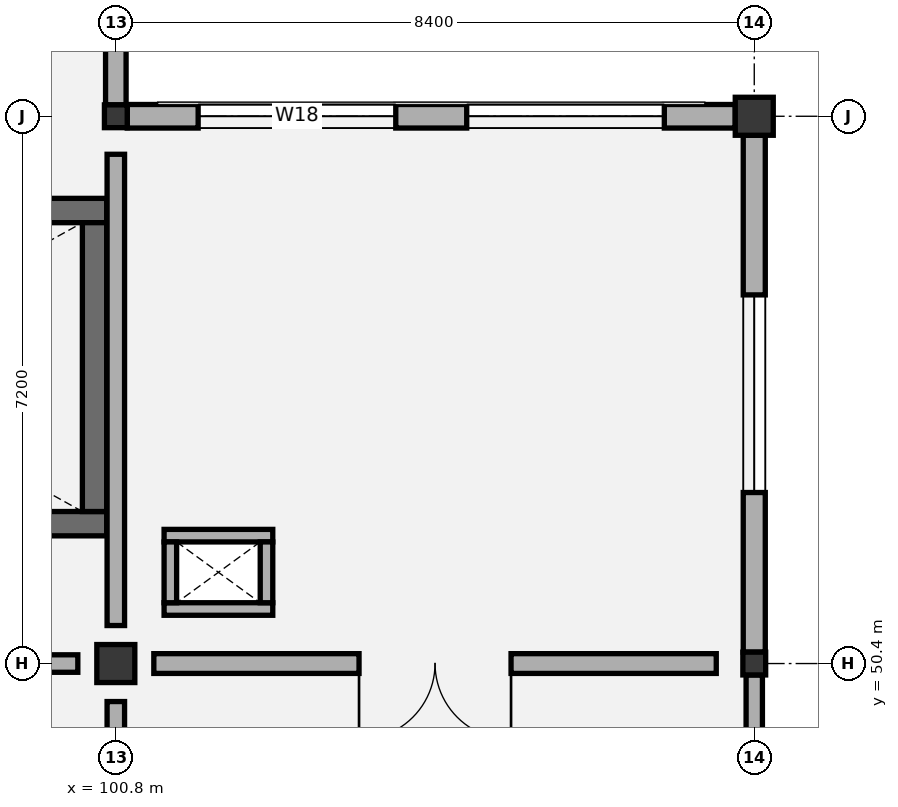
"""IFC4 building model, lengths in metres.
Left out: names, types, materials, properties, quantities, classifications, styles, units other than length and angle.
Written with IfcOpenShell. Run it as: python <this file> out.ifc"""

import sys

from ifc_helpers import new_model, si_unit, direction, frame, frame_2d, origin, origin_2d, place, context, subcontext, project, spatial, rectangle, i_section, extrude, element, fill, save


model = new_model("IFC4")
c1 = context("Model", 3, precision=1e-05, world=origin(), true_north=direction((0.0, 1.0)))
c2 = subcontext(c1, "Body", "Model", "MODEL_VIEW")
j1 = project(units=[si_unit("LENGTHUNIT", "METRE"), si_unit("PLANEANGLEUNIT", "RADIAN")], contexts=[c1])
p1 = place(None, origin())
s1 = spatial("IfcSite", under=j1, at=p1, CompositionType="ELEMENT")
p2 = place(p1, origin())
s2 = spatial("IfcBuilding", under=s1, at=p2, CompositionType="ELEMENT")
p3 = place(p2, frame((0.0, 0.0, 69.0)))
s3 = spatial("IfcBuildingStorey", under=s2, at=p3, CompositionType="ELEMENT", Elevation=69.0)
p4 = place(p3, frame((100.8, 50.4, 0.0), z_axis=(0.0, 0.0, 1.0), x_axis=(1.0, 0.0, 0.0)))
e1 = element("IfcColumn", 1, at=p4, inside=s3, PredefinedType="COLUMN", context=c2, shape_type="SweptSolid", body=[
    extrude(rectangle(XDim=0.5, YDim=0.5, at=origin_2d()), origin(), (0.0, 0.0, 1.0), 4.8),
])
for number, where, z_axis, x_axis in (
    (2, (100.8, 57.6, 0.0), (0.0, 0.0, 1.0), (1.0, 0.0, 0.0)),
    (3, (109.2, 50.4, 0.0), (0.0, 0.0, 1.0), (1.0, 0.0, 0.0)),
):
    element("IfcColumn", number, at=place(p3, frame(where, z_axis=z_axis, x_axis=x_axis)), inside=s3, PredefinedType="COLUMN", context=c2, shape_type="SweptSolid", body=[
        extrude(i_section(OverallWidth=0.3, OverallDepth=0.3, WebThickness=0.011, FlangeThickness=0.019, FilletRadius=0.027, at=origin_2d()), origin(), (0.0, 0.0, 1.0), 4.8),
    ])
p5 = place(p3, frame((109.2, 57.6, 0.0), z_axis=(0.0, 0.0, 1.0), x_axis=(1.0, 0.0, 0.0)))
e4 = element("IfcColumn", 4, at=p5, inside=s3, PredefinedType="COLUMN", context=c2, shape_type="SweptSolid", body=[
    extrude(rectangle(XDim=0.5, YDim=0.5, at=origin_2d()), origin(), (0.0, 0.0, 1.0), 4.8),
])
p6 = place(p3, frame((93.2, 52.24, 0.0), z_axis=(0.0, 0.0, 1.0), x_axis=(1.0, 0.0, 0.0)))
e5 = element("IfcWall", 5, at=p6, inside=s3, PredefinedType="SHEAR", context=c2, shape_type="SweptSolid", body=[
    extrude(rectangle(XDim=7.48, YDim=0.32, at=frame_2d((3.74, 0.0))), origin(), (0.0, 0.0, 1.0), 4.6),
])
p7 = place(p6, frame((0.45, 0.0, 0.0)))
e6 = element("IfcOpeningElement", 6, at=p7, cuts=e5, PredefinedType="OPENING", context=c2, shape_type="SweptSolid", body=[
    extrude(rectangle(XDim=1.05, YDim=2.15, at=frame_2d((0.525, 1.075))), frame((0.0, 0.17, 0.0), z_axis=(0.0, -1.0, 0.0), x_axis=(1.0, 0.0, 0.0)), (0.0, 0.0, 1.0), 0.34),
])
p8 = place(p3, frame((93.2, 56.36, 0.0), z_axis=(0.0, 0.0, 1.0), x_axis=(1.0, 0.0, 0.0)))
e7 = element("IfcWall", 7, at=p8, inside=s3, PredefinedType="SHEAR", context=c2, shape_type="SweptSolid", body=[
    extrude(rectangle(XDim=7.48, YDim=0.32, at=frame_2d((3.74, 0.0))), origin(), (0.0, 0.0, 1.0), 4.6),
])
p9 = place(p3, frame((100.52, 52.4, 0.0), z_axis=(0.0, 0.0, 1.0), x_axis=(0.0, 1.0, 0.0)))
e8 = element("IfcWall", 8, at=p9, inside=s3, PredefinedType="SHEAR", context=c2, shape_type="SweptSolid", body=[
    extrude(rectangle(XDim=3.8, YDim=0.32, at=frame_2d((1.9, 0.0))), origin(), (0.0, 0.0, 1.0), 4.6),
])
p10 = place(p3, frame((100.8, 57.75, 0.0), z_axis=(0.0, 0.0, 1.0), x_axis=(0.0, 1.0, 0.0)))
e9 = element("IfcWall", 9, at=p10, inside=s3, PredefinedType="SOLIDWALL", context=c2, shape_type="SweptSolid", body=[
    extrude(rectangle(XDim=6.8, YDim=0.27, at=frame_2d((3.4, 0.0))), origin(), (0.0, 0.0, 1.0), 4.045),
])
p11 = place(p10, frame((1.8, 0.0, 1.45)))
e10 = element("IfcOpeningElement", 10, at=p11, cuts=e9, PredefinedType="OPENING", context=c2, shape_type="SweptSolid", body=[
    extrude(rectangle(XDim=3.2, YDim=1.2, at=frame_2d((1.6, 0.6))), frame((0.0, 0.145, 0.0), z_axis=(0.0, -1.0, 0.0), x_axis=(1.0, 0.0, 0.0)), (0.0, 0.0, 1.0), 0.29),
])
p12 = place(p3, frame((109.2, 43.45, 0.0), z_axis=(0.0, 0.0, 1.0), x_axis=(0.0, 1.0, 0.0)))
e11 = element("IfcWall", 11, at=p12, inside=s3, PredefinedType="SOLIDWALL", context=c2, shape_type="SweptSolid", body=[
    extrude(rectangle(XDim=6.8, YDim=0.215, at=frame_2d((3.4, 0.0))), origin(), (0.0, 0.0, 1.0), 4.045),
])
p13 = place(p12, frame((0.867, 0.0, 1.45)))
e12 = element("IfcOpeningElement", 12, at=p13, cuts=e11, PredefinedType="OPENING", context=c2, shape_type="SweptSolid", body=[
    extrude(rectangle(XDim=2.1, YDim=1.35, at=frame_2d((1.05, 0.675))), frame((0.0, 0.117, 0.0), z_axis=(0.0, -1.0, 0.0), x_axis=(1.0, 0.0, 0.0)), (0.0, 0.0, 1.0), 0.235),
])
p14 = place(p12, frame((3.833, 0.0, 1.45)))
e13 = element("IfcOpeningElement", 13, at=p14, cuts=e11, PredefinedType="OPENING", context=c2, shape_type="SweptSolid", body=[
    extrude(rectangle(XDim=2.1, YDim=1.35, at=frame_2d((1.05, 0.675))), frame((0.0, 0.117, 0.0), z_axis=(0.0, -1.0, 0.0), x_axis=(1.0, 0.0, 0.0)), (0.0, 0.0, 1.0), 0.235),
])
p15 = place(p3, frame((100.95, 57.6, 0.0), z_axis=(0.0, 0.0, 1.0), x_axis=(1.0, 0.0, 0.0)))
e14 = element("IfcWall", 14, at=p15, inside=s3, PredefinedType="SOLIDWALL", context=c2, shape_type="SweptSolid", body=[
    extrude(rectangle(XDim=8.0, YDim=0.31, at=frame_2d((4.0, 0.0))), origin(), (0.0, 0.0, 1.0), 4.365),
])
p16 = place(p15, frame((0.933, 0.0, 1.45)))
e15 = element("IfcOpeningElement", 15, at=p16, cuts=e14, PredefinedType="OPENING", context=c2, shape_type="SweptSolid", body=[
    extrude(rectangle(XDim=2.6, YDim=1.2, at=frame_2d((1.3, 0.6))), frame((0.0, 0.165, 0.0), z_axis=(0.0, -1.0, 0.0), x_axis=(1.0, 0.0, 0.0)), (0.0, 0.0, 1.0), 0.33),
])
p17 = place(p15, frame((4.467, 0.0, 1.45)))
e16 = element("IfcOpeningElement", 16, at=p17, cuts=e14, PredefinedType="OPENING", context=c2, shape_type="SweptSolid", body=[
    extrude(rectangle(XDim=2.6, YDim=1.2, at=frame_2d((1.3, 0.6))), frame((0.0, 0.165, 0.0), z_axis=(0.0, -1.0, 0.0), x_axis=(1.0, 0.0, 0.0)), (0.0, 0.0, 1.0), 0.33),
])
p18 = place(p3, frame((109.2, 50.55, 0.0), z_axis=(0.0, 0.0, 1.0), x_axis=(0.0, 1.0, 0.0)))
e17 = element("IfcWall", 17, at=p18, inside=s3, PredefinedType="SOLIDWALL", context=c2, shape_type="SweptSolid", body=[
    extrude(rectangle(XDim=6.8, YDim=0.29, at=frame_2d((3.4, 0.0))), origin(), (0.0, 0.0, 1.0), 4.045),
])
p19 = place(p18, frame((2.1, 0.0, 1.45)))
e18 = element("IfcOpeningElement", 18, at=p19, cuts=e17, PredefinedType="OPENING", context=c2, shape_type="SweptSolid", body=[
    extrude(rectangle(XDim=2.6, YDim=1.2, at=frame_2d((1.3, 0.6))), frame((0.0, 0.155, 0.0), z_axis=(0.0, -1.0, 0.0), x_axis=(1.0, 0.0, 0.0)), (0.0, 0.0, 1.0), 0.31),
])
p20 = place(p3, frame((109.2, 57.72, 0.0), z_axis=(0.0, 0.0, 1.0), x_axis=(0.0, 1.0, 0.0)))
e19 = element("IfcWall", 19, at=p20, inside=s3, PredefinedType="PARAPET", context=c2, shape_type="SweptSolid", body=[
    extrude(rectangle(XDim=6.96, YDim=0.185, at=frame_2d((3.48, 0.0))), origin(), (0.0, 0.0, 1.0), 1.15),
])
for number, where, z_axis, x_axis in (
    (20, (101.435, 51.117, 0.0), (0.0, 0.0, 1.0), (1.0, 0.0, 0.0)),
    (21, (101.435, 52.083, 0.0), (0.0, 0.0, 1.0), (1.0, 0.0, 0.0)),
):
    element("IfcWall", number, at=place(p3, frame(where, z_axis=z_axis, x_axis=x_axis)), inside=s3, PredefinedType="PARTITIONING", context=c2, shape_type="SweptSolid", body=[
        extrude(rectangle(XDim=1.43, YDim=0.165, at=frame_2d((0.715, 0.0))), origin(), (0.0, 0.0, 1.0), 4.6),
    ])
for number, where, z_axis, x_axis in (
    (22, (101.518, 51.2, 0.0), (0.0, 0.0, 1.0), (0.0, 1.0, 0.0)),
    (23, (102.782, 51.2, 0.0), (0.0, 0.0, 1.0), (0.0, 1.0, 0.0)),
):
    element("IfcWall", number, at=place(p3, frame(where, z_axis=z_axis, x_axis=x_axis)), inside=s3, PredefinedType="PARTITIONING", context=c2, shape_type="SweptSolid", body=[
        extrude(rectangle(XDim=0.8, YDim=0.165, at=frame_2d((0.4, 0.0))), origin(), (0.0, 0.0, 1.0), 4.6),
    ])
p21 = place(p3, frame((100.8, 43.7, 0.0), z_axis=(0.0, 0.0, 1.0), x_axis=(0.0, 1.0, 0.0)))
e24 = element("IfcWall", 24, at=p21, inside=s3, PredefinedType="PARTITIONING", context=c2, shape_type="SweptSolid", body=[
    extrude(rectangle(XDim=6.2, YDim=0.23, at=frame_2d((3.1, 0.0))), origin(), (0.0, 0.0, 1.0), 4.095),
])
p22 = place(p21, frame((2.1, 0.0, 0.0)))
e25 = element("IfcOpeningElement", 25, at=p22, cuts=e24, PredefinedType="OPENING", context=c2, shape_type="SweptSolid", body=[
    extrude(rectangle(XDim=2.0, YDim=2.35, at=frame_2d((1.0, 1.175))), frame((0.0, 0.125, 0.0), z_axis=(0.0, -1.0, 0.0), x_axis=(1.0, 0.0, 0.0)), (0.0, 0.0, 1.0), 0.25),
])
p23 = place(p3, frame((92.9, 50.4, 0.0), z_axis=(0.0, 0.0, 1.0), x_axis=(1.0, 0.0, 0.0)))
e26 = element("IfcWall", 26, at=p23, inside=s3, PredefinedType="PARTITIONING", context=c2, shape_type="SweptSolid", body=[
    extrude(rectangle(XDim=7.4, YDim=0.23, at=frame_2d((3.7, 0.0))), origin(), (0.0, 0.0, 1.0), 3.995),
])
p24 = place(p23, frame((2.95, 0.0, 0.0)))
e27 = element("IfcOpeningElement", 27, at=p24, cuts=e26, PredefinedType="OPENING", context=c2, shape_type="SweptSolid", body=[
    extrude(rectangle(XDim=1.5, YDim=2.15, at=frame_2d((0.75, 1.075))), frame((0.0, 0.125, 0.0), z_axis=(0.0, -1.0, 0.0), x_axis=(1.0, 0.0, 0.0)), (0.0, 0.0, 1.0), 0.25),
])
p25 = place(p3, frame((100.8, 50.9, 0.0), z_axis=(0.0, 0.0, 1.0), x_axis=(0.0, 1.0, 0.0)))
e28 = element("IfcWall", 28, at=p25, inside=s3, PredefinedType="PARTITIONING", context=c2, shape_type="SweptSolid", body=[
    extrude(rectangle(XDim=6.2, YDim=0.23, at=frame_2d((3.1, 0.0))), origin(), (0.0, 0.0, 1.0), 4.095),
])
p26 = place(p3, frame((101.3, 50.4, 0.0), z_axis=(0.0, 0.0, 1.0), x_axis=(1.0, 0.0, 0.0)))
e29 = element("IfcWall", 29, at=p26, inside=s3, PredefinedType="PARTITIONING", context=c2, shape_type="SweptSolid", body=[
    extrude(rectangle(XDim=7.4, YDim=0.26, at=frame_2d((3.7, 0.0))), origin(), (0.0, 0.0, 1.0), 4.095),
])
p27 = place(p26, frame((2.7, 0.0, 0.0)))
e30 = element("IfcOpeningElement", 30, at=p27, cuts=e29, PredefinedType="OPENING", context=c2, shape_type="SweptSolid", body=[
    extrude(rectangle(XDim=2.0, YDim=2.35, at=frame_2d((1.0, 1.175))), frame((0.0, 0.14, 0.0), z_axis=(0.0, -1.0, 0.0), x_axis=(1.0, 0.0, 0.0)), (0.0, 0.0, 1.0), 0.28),
])
p28 = place(p16, origin())
e31 = element("IfcWindow", 31, at=p28, inside=s3, PartitioningType="SINGLE_PANEL", PredefinedType="WINDOW", context=c2, shape_type="SweptSolid", body=[
    extrude(rectangle(XDim=2.6, YDim=1.2, at=frame_2d((1.3, 0.6))), frame((0.0, 0.03, 0.0), z_axis=(0.0, -1.0, 0.0), x_axis=(1.0, 0.0, 0.0)), (0.0, 0.0, 1.0), 0.06),
])
fill(e15, e31)
p29 = place(p17, origin())
e32 = element("IfcWindow", 32, at=p29, inside=s3, PartitioningType="SINGLE_PANEL", PredefinedType="WINDOW", context=c2, shape_type="SweptSolid", body=[
    extrude(rectangle(XDim=2.6, YDim=1.2, at=frame_2d((1.3, 0.6))), frame((0.0, 0.03, 0.0), z_axis=(0.0, -1.0, 0.0), x_axis=(1.0, 0.0, 0.0)), (0.0, 0.0, 1.0), 0.06),
])
fill(e16, e32)
p30 = place(p19, origin())
e33 = element("IfcWindow", 33, at=p30, inside=s3, PartitioningType="SINGLE_PANEL", PredefinedType="WINDOW", context=c2, shape_type="SweptSolid", body=[
    extrude(rectangle(XDim=2.6, YDim=1.2, at=frame_2d((1.3, 0.6))), frame((0.0, 0.03, 0.0), z_axis=(0.0, -1.0, 0.0), x_axis=(1.0, 0.0, 0.0)), (0.0, 0.0, 1.0), 0.06),
])
fill(e18, e33)
p31 = place(p27, frame((2.0, 0.0, 0.0), z_axis=(0.0, 0.0, 1.0), x_axis=(-1.0, 0.0, 0.0)))
e34 = element("IfcDoor", 34, at=p31, inside=s3, OperationType="DOUBLE_DOOR_SINGLE_SWING", PredefinedType="DOOR", context=c2, shape_type="SweptSolid", body=[
    extrude(rectangle(XDim=2.0, YDim=2.35, at=frame_2d((1.0, 1.175))), frame((0.0, 0.025, 0.0), z_axis=(0.0, -1.0, 0.0), x_axis=(1.0, 0.0, 0.0)), (0.0, 0.0, 1.0), 0.05),
])
fill(e30, e34)
save(model, sys.argv[1])
